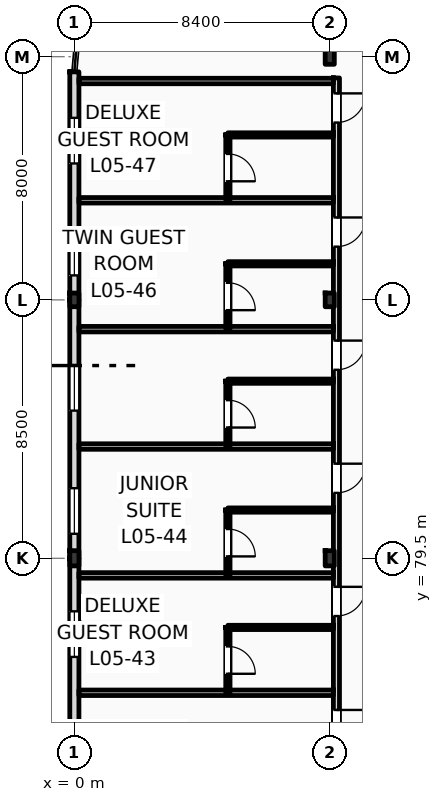
"""IFC4 building model, lengths in metres.
Left out: names, types, materials, properties, quantities, classifications, styles, units other than length and angle.
Written with IfcOpenShell. Run it as: python <this file> out.ifc"""

import sys

from ifc_helpers import new_model, si_unit, direction, frame, frame_2d, origin, origin_2d, place, context, subcontext, project, spatial, rectangle, i_section, extrude, element, fill, save


model = new_model("IFC4")
c1 = context("Model", 3, precision=1e-05, world=origin(), true_north=direction((0.0, 1.0)))
c2 = subcontext(c1, "Body", "Model", "MODEL_VIEW")
j1 = project(units=[si_unit("LENGTHUNIT", "METRE"), si_unit("PLANEANGLEUNIT", "RADIAN")], contexts=[c1])
p1 = place(None, origin())
s1 = spatial("IfcSite", under=j1, at=p1, CompositionType="ELEMENT")
p2 = place(p1, origin())
s2 = spatial("IfcBuilding", under=s1, at=p2, CompositionType="ELEMENT")
p3 = place(p2, frame((0.0, 0.0, 24.6)))
s3 = spatial("IfcBuildingStorey", under=s2, at=p3, CompositionType="ELEMENT", Elevation=24.6)
p4 = place(p3, frame((0.0, 79.5, 0.0), z_axis=(0.0, 0.0, 1.0), x_axis=(1.0, 0.0, 0.0)))
e1 = element("IfcColumn", 1, at=p4, inside=s3, PredefinedType="COLUMN", context=c2, shape_type="SweptSolid", body=[
    extrude(i_section(OverallWidth=0.3, OverallDepth=0.5, WebThickness=0.014, FlangeThickness=0.028, FilletRadius=0.027, at=origin_2d()), origin(), (0.0, 0.0, 1.0), 3.6),
])
p5 = place(p3, frame((0.0, 88.0, 0.0), z_axis=(0.0, 0.0, 1.0), x_axis=(1.0, 0.0, 0.0)))
e2 = element("IfcColumn", 2, at=p5, inside=s3, PredefinedType="COLUMN", context=c2, shape_type="SweptSolid", body=[
    extrude(i_section(OverallWidth=0.3, OverallDepth=0.45, WebThickness=0.014, FlangeThickness=0.026, FilletRadius=0.027, at=origin_2d()), origin(), (0.0, 0.0, 1.0), 3.6),
])
p6 = place(p3, frame((8.4, 79.5, 0.0), z_axis=(0.0, 0.0, 1.0), x_axis=(1.0, 0.0, 0.0)))
e3 = element("IfcColumn", 3, at=p6, inside=s3, PredefinedType="COLUMN", context=c2, shape_type="SweptSolid", body=[
    extrude(i_section(OverallWidth=0.3, OverallDepth=0.5, WebThickness=0.014, FlangeThickness=0.028, FilletRadius=0.027, at=origin_2d()), origin(), (0.0, 0.0, 1.0), 3.6),
])
p7 = place(p3, frame((8.4, 88.0, 0.0), z_axis=(0.0, 0.0, 1.0), x_axis=(1.0, 0.0, 0.0)))
e4 = element("IfcColumn", 4, at=p7, inside=s3, PredefinedType="COLUMN", context=c2, shape_type="SweptSolid", body=[
    extrude(i_section(OverallWidth=0.3, OverallDepth=0.45, WebThickness=0.014, FlangeThickness=0.026, FilletRadius=0.027, at=origin_2d()), origin(), (0.0, 0.0, 1.0), 3.6),
])
p8 = place(p3, frame((8.4, 96.0, 0.0), z_axis=(0.0, 0.0, 1.0), x_axis=(1.0, 0.0, 0.0)))
e5 = element("IfcColumn", 5, at=p8, inside=s3, PredefinedType="COLUMN", context=c2, shape_type="SweptSolid", body=[
    extrude(i_section(OverallWidth=0.3, OverallDepth=0.5, WebThickness=0.014, FlangeThickness=0.028, FilletRadius=0.027, at=origin_2d()), origin(), (0.0, 0.0, 1.0), 3.6),
])
p9 = place(p3, frame((0.0, 71.0, 0.0), z_axis=(0.0, 0.0, 1.0), x_axis=(0.0, 1.0, 0.0)))
e6 = element("IfcWall", 6, at=p9, inside=s3, PredefinedType="STANDARD", context=c2, shape_type="SweptSolid", body=[
    extrude(rectangle(XDim=8.5, YDim=0.3, at=frame_2d((4.25, 0.0))), origin(), (0.0, 0.0, 1.0), 2.93),
])
p10 = place(p9, frame((1.207, 0.0, 0.9)))
e7 = element("IfcOpeningElement", 7, at=p10, cuts=e6, PredefinedType="OPENING", context=c2, shape_type="SweptSolid", body=[
    extrude(rectangle(XDim=1.5, YDim=1.85, at=frame_2d((0.75, 0.925))), frame((0.0, 0.16, 0.0), z_axis=(0.0, -1.0, 0.0), x_axis=(1.0, 0.0, 0.0)), (0.0, 0.0, 1.0), 0.32),
])
p11 = place(p9, frame((5.256, 0.0, 0.9)))
e8 = element("IfcOpeningElement", 8, at=p11, cuts=e6, PredefinedType="OPENING", context=c2, shape_type="SweptSolid", body=[
    extrude(rectangle(XDim=1.5, YDim=1.85, at=frame_2d((0.75, 0.925))), frame((0.0, 0.16, 0.0), z_axis=(0.0, -1.0, 0.0), x_axis=(1.0, 0.0, 0.0)), (0.0, 0.0, 1.0), 0.32),
])
p12 = place(p3, frame((0.0, 79.5, 0.0), z_axis=(0.0, 0.0, 1.0), x_axis=(0.0, 1.0, 0.0)))
e9 = element("IfcWall", 9, at=p12, inside=s3, PredefinedType="STANDARD", context=c2, shape_type="SweptSolid", body=[
    extrude(rectangle(XDim=8.5, YDim=0.3, at=frame_2d((4.25, 0.0))), origin(), (0.0, 0.0, 1.0), 2.93),
])
p13 = place(p12, frame((0.806, 0.0, 0.9)))
e10 = element("IfcOpeningElement", 10, at=p13, cuts=e9, PredefinedType="OPENING", context=c2, shape_type="SweptSolid", body=[
    extrude(rectangle(XDim=1.5, YDim=1.85, at=frame_2d((0.75, 0.925))), frame((0.0, 0.16, 0.0), z_axis=(0.0, -1.0, 0.0), x_axis=(1.0, 0.0, 0.0)), (0.0, 0.0, 1.0), 0.32),
])
p14 = place(p12, frame((4.857, 0.0, 0.9)))
e11 = element("IfcOpeningElement", 11, at=p14, cuts=e9, PredefinedType="OPENING", context=c2, shape_type="SweptSolid", body=[
    extrude(rectangle(XDim=1.5, YDim=1.85, at=frame_2d((0.75, 0.925))), frame((0.0, 0.16, 0.0), z_axis=(0.0, -1.0, 0.0), x_axis=(1.0, 0.0, 0.0)), (0.0, 0.0, 1.0), 0.32),
])
p15 = place(p3, frame((0.0, 88.0, 0.0), z_axis=(0.0, 0.0, 1.0), x_axis=(0.0, 1.0, 0.0)))
e12 = element("IfcWall", 12, at=p15, inside=s3, PredefinedType="STANDARD", context=c2, shape_type="SweptSolid", body=[
    extrude(rectangle(XDim=7.5, YDim=0.3, at=frame_2d((3.75, 0.0))), origin(), (0.0, 0.0, 1.0), 3.34),
])
p16 = place(p15, frame((0.806, 0.0, 0.9)))
e13 = element("IfcOpeningElement", 13, at=p16, cuts=e12, PredefinedType="OPENING", context=c2, shape_type="SweptSolid", body=[
    extrude(rectangle(XDim=1.5, YDim=2.26, at=frame_2d((0.75, 1.13))), frame((0.0, 0.16, 0.0), z_axis=(0.0, -1.0, 0.0), x_axis=(1.0, 0.0, 0.0)), (0.0, 0.0, 1.0), 0.32),
])
p17 = place(p15, frame((4.488, 0.0, 0.9)))
e14 = element("IfcOpeningElement", 14, at=p17, cuts=e12, PredefinedType="OPENING", context=c2, shape_type="SweptSolid", body=[
    extrude(rectangle(XDim=1.5, YDim=2.26, at=frame_2d((0.75, 1.13))), frame((0.0, 0.16, 0.0), z_axis=(0.0, -1.0, 0.0), x_axis=(1.0, 0.0, 0.0)), (0.0, 0.0, 1.0), 0.32),
])
p18 = place(p3, frame((8.62, 62.64, 0.0), z_axis=(0.0, 0.0, 1.0), x_axis=(0.0, 1.0, 0.0)))
e15 = element("IfcWall", 15, at=p18, inside=s3, PredefinedType="PARTITIONING", context=c2, shape_type="SweptSolid", body=[
    extrude(rectangle(XDim=32.66, YDim=0.2, at=frame_2d((16.33, 0.0))), origin(), (0.0, 0.0, 1.0), 2.93),
])
p19 = place(p18, frame((2.843, 0.0, 0.0)))
e16 = element("IfcOpeningElement", 16, at=p19, cuts=e15, PredefinedType="OPENING", context=c2, shape_type="SweptSolid", body=[
    extrude(rectangle(XDim=0.96, YDim=2.2, at=frame_2d((0.48, 1.1))), frame((0.0, 0.11, 0.0), z_axis=(0.0, -1.0, 0.0), x_axis=(1.0, 0.0, 0.0)), (0.0, 0.0, 1.0), 0.22),
])
p20 = place(p18, frame((4.711, 0.0, 0.0)))
e17 = element("IfcOpeningElement", 17, at=p20, cuts=e15, PredefinedType="OPENING", context=c2, shape_type="SweptSolid", body=[
    extrude(rectangle(XDim=0.96, YDim=2.2, at=frame_2d((0.48, 1.1))), frame((0.0, 0.11, 0.0), z_axis=(0.0, -1.0, 0.0), x_axis=(1.0, 0.0, 0.0)), (0.0, 0.0, 1.0), 0.22),
])
p21 = place(p18, frame((10.911, 0.0, 0.0)))
e18 = element("IfcOpeningElement", 18, at=p21, cuts=e15, PredefinedType="OPENING", context=c2, shape_type="SweptSolid", body=[
    extrude(rectangle(XDim=0.96, YDim=2.2, at=frame_2d((0.48, 1.1))), frame((0.0, 0.11, 0.0), z_axis=(0.0, -1.0, 0.0), x_axis=(1.0, 0.0, 0.0)), (0.0, 0.0, 1.0), 0.22),
])
p22 = place(p18, frame((14.961, 0.0, 0.0)))
e19 = element("IfcOpeningElement", 19, at=p22, cuts=e15, PredefinedType="OPENING", context=c2, shape_type="SweptSolid", body=[
    extrude(rectangle(XDim=0.96, YDim=2.2, at=frame_2d((0.48, 1.1))), frame((0.0, 0.11, 0.0), z_axis=(0.0, -1.0, 0.0), x_axis=(1.0, 0.0, 0.0)), (0.0, 0.0, 1.0), 0.22),
])
p23 = place(p18, frame((19.012, 0.0, 0.0)))
e20 = element("IfcOpeningElement", 20, at=p23, cuts=e15, PredefinedType="OPENING", context=c2, shape_type="SweptSolid", body=[
    extrude(rectangle(XDim=0.96, YDim=2.2, at=frame_2d((0.48, 1.1))), frame((0.0, 0.11, 0.0), z_axis=(0.0, -1.0, 0.0), x_axis=(1.0, 0.0, 0.0)), (0.0, 0.0, 1.0), 0.22),
])
p24 = place(p18, frame((23.061, 0.0, 0.0)))
e21 = element("IfcOpeningElement", 21, at=p24, cuts=e15, PredefinedType="OPENING", context=c2, shape_type="SweptSolid", body=[
    extrude(rectangle(XDim=0.96, YDim=2.2, at=frame_2d((0.48, 1.1))), frame((0.0, 0.11, 0.0), z_axis=(0.0, -1.0, 0.0), x_axis=(1.0, 0.0, 0.0)), (0.0, 0.0, 1.0), 0.22),
])
p25 = place(p18, frame((27.111, 0.0, 0.0)))
e22 = element("IfcOpeningElement", 22, at=p25, cuts=e15, PredefinedType="OPENING", context=c2, shape_type="SweptSolid", body=[
    extrude(rectangle(XDim=0.96, YDim=2.2, at=frame_2d((0.48, 1.1))), frame((0.0, 0.11, 0.0), z_axis=(0.0, -1.0, 0.0), x_axis=(1.0, 0.0, 0.0)), (0.0, 0.0, 1.0), 0.22),
])
p26 = place(p18, frame((31.193, 0.0, 0.0)))
e23 = element("IfcOpeningElement", 23, at=p26, cuts=e15, PredefinedType="OPENING", context=c2, shape_type="SweptSolid", body=[
    extrude(rectangle(XDim=0.96, YDim=2.2, at=frame_2d((0.48, 1.1))), frame((0.0, 0.11, 0.0), z_axis=(0.0, -1.0, 0.0), x_axis=(1.0, 0.0, 0.0)), (0.0, 0.0, 1.0), 0.22),
])
for number, where, z_axis, x_axis in (
    (24, (0.15, 75.076, 0.0), (0.0, 0.0, 1.0), (1.0, 0.0, 0.0)),
    (25, (0.15, 78.937, 0.0), (0.0, 0.0, 1.0), (1.0, 0.0, 0.0)),
):
    element("IfcWall", number, at=place(p3, frame(where, z_axis=z_axis, x_axis=x_axis)), inside=s3, PredefinedType="PARTITIONING", context=c2, shape_type="SweptSolid", body=[
        extrude(rectangle(XDim=8.37, YDim=0.18, at=frame_2d((4.185, 0.0))), origin(), (0.0, 0.0, 1.0), 3.34),
    ])
p27 = place(p3, frame((5.05, 77.226, 0.0), z_axis=(0.0, 0.0, 1.0), x_axis=(1.0, 0.0, 0.0)))
e26 = element("IfcWall", 26, at=p27, inside=s3, PredefinedType="PARTITIONING", context=c2, shape_type="SweptSolid", body=[
    extrude(rectangle(XDim=3.47, YDim=0.14, at=frame_2d((1.735, 0.0))), origin(), (0.0, 0.0, 1.0), 3.34),
])
p28 = place(p3, frame((5.05, 75.076, 0.0), z_axis=(0.0, 0.0, 1.0), x_axis=(0.0, 1.0, 0.0)))
e27 = element("IfcWall", 27, at=p28, inside=s3, PredefinedType="PARTITIONING", context=c2, shape_type="SweptSolid", body=[
    extrude(rectangle(XDim=2.15, YDim=0.14, at=frame_2d((1.075, 0.0))), origin(), (0.0, 0.0, 1.0), 3.34),
])
p29 = place(p28, frame((0.625, 0.0, 0.0)))
e28 = element("IfcOpeningElement", 28, at=p29, cuts=e27, PredefinedType="OPENING", context=c2, shape_type="SweptSolid", body=[
    extrude(rectangle(XDim=0.9, YDim=2.1, at=frame_2d((0.45, 1.05))), frame((0.0, 0.08, 0.0), z_axis=(0.0, -1.0, 0.0), x_axis=(1.0, 0.0, 0.0)), (0.0, 0.0, 1.0), 0.16),
])
p30 = place(p3, frame((0.15, 83.176, 0.0), z_axis=(0.0, 0.0, 1.0), x_axis=(1.0, 0.0, 0.0)))
e29 = element("IfcWall", 29, at=p30, inside=s3, PredefinedType="PARTITIONING", context=c2, shape_type="SweptSolid", body=[
    extrude(rectangle(XDim=8.37, YDim=0.18, at=frame_2d((4.185, 0.0))), origin(), (0.0, 0.0, 1.0), 3.34),
])
p31 = place(p3, frame((5.05, 81.087, 0.0), z_axis=(0.0, 0.0, 1.0), x_axis=(1.0, 0.0, 0.0)))
e30 = element("IfcWall", 30, at=p31, inside=s3, PredefinedType="PARTITIONING", context=c2, shape_type="SweptSolid", body=[
    extrude(rectangle(XDim=3.47, YDim=0.14, at=frame_2d((1.735, 0.0))), origin(), (0.0, 0.0, 1.0), 3.34),
])
p32 = place(p3, frame((5.05, 78.937, 0.0), z_axis=(0.0, 0.0, 1.0), x_axis=(0.0, 1.0, 0.0)))
e31 = element("IfcWall", 31, at=p32, inside=s3, PredefinedType="PARTITIONING", context=c2, shape_type="SweptSolid", body=[
    extrude(rectangle(XDim=2.15, YDim=0.14, at=frame_2d((1.075, 0.0))), origin(), (0.0, 0.0, 1.0), 3.34),
])
p33 = place(p32, frame((0.625, 0.0, 0.0)))
e32 = element("IfcOpeningElement", 32, at=p33, cuts=e31, PredefinedType="OPENING", context=c2, shape_type="SweptSolid", body=[
    extrude(rectangle(XDim=0.9, YDim=2.1, at=frame_2d((0.45, 1.05))), frame((0.0, 0.08, 0.0), z_axis=(0.0, -1.0, 0.0), x_axis=(1.0, 0.0, 0.0)), (0.0, 0.0, 1.0), 0.16),
])
p34 = place(p3, frame((0.15, 87.037, 0.0), z_axis=(0.0, 0.0, 1.0), x_axis=(1.0, 0.0, 0.0)))
e33 = element("IfcWall", 33, at=p34, inside=s3, PredefinedType="PARTITIONING", context=c2, shape_type="SweptSolid", body=[
    extrude(rectangle(XDim=8.37, YDim=0.18, at=frame_2d((4.185, 0.0))), origin(), (0.0, 0.0, 1.0), 3.34),
])
p35 = place(p3, frame((5.05, 85.326, 0.0), z_axis=(0.0, 0.0, 1.0), x_axis=(1.0, 0.0, 0.0)))
e34 = element("IfcWall", 34, at=p35, inside=s3, PredefinedType="PARTITIONING", context=c2, shape_type="SweptSolid", body=[
    extrude(rectangle(XDim=3.47, YDim=0.14, at=frame_2d((1.735, 0.0))), origin(), (0.0, 0.0, 1.0), 3.34),
])
p36 = place(p3, frame((5.05, 83.176, 0.0), z_axis=(0.0, 0.0, 1.0), x_axis=(0.0, 1.0, 0.0)))
e35 = element("IfcWall", 35, at=p36, inside=s3, PredefinedType="PARTITIONING", context=c2, shape_type="SweptSolid", body=[
    extrude(rectangle(XDim=2.15, YDim=0.14, at=frame_2d((1.075, 0.0))), origin(), (0.0, 0.0, 1.0), 3.34),
])
p37 = place(p36, frame((0.625, 0.0, 0.0)))
e36 = element("IfcOpeningElement", 36, at=p37, cuts=e35, PredefinedType="OPENING", context=c2, shape_type="SweptSolid", body=[
    extrude(rectangle(XDim=0.9, YDim=2.1, at=frame_2d((0.45, 1.05))), frame((0.0, 0.08, 0.0), z_axis=(0.0, -1.0, 0.0), x_axis=(1.0, 0.0, 0.0)), (0.0, 0.0, 1.0), 0.16),
])
p38 = place(p3, frame((0.15, 91.276, 0.0), z_axis=(0.0, 0.0, 1.0), x_axis=(1.0, 0.0, 0.0)))
e37 = element("IfcWall", 37, at=p38, inside=s3, PredefinedType="PARTITIONING", context=c2, shape_type="SweptSolid", body=[
    extrude(rectangle(XDim=8.37, YDim=0.18, at=frame_2d((4.185, 0.0))), origin(), (0.0, 0.0, 1.0), 3.34),
])
p39 = place(p3, frame((5.05, 89.187, 0.0), z_axis=(0.0, 0.0, 1.0), x_axis=(1.0, 0.0, 0.0)))
e38 = element("IfcWall", 38, at=p39, inside=s3, PredefinedType="PARTITIONING", context=c2, shape_type="SweptSolid", body=[
    extrude(rectangle(XDim=3.47, YDim=0.14, at=frame_2d((1.735, 0.0))), origin(), (0.0, 0.0, 1.0), 3.34),
])
p40 = place(p3, frame((5.05, 87.037, 0.0), z_axis=(0.0, 0.0, 1.0), x_axis=(0.0, 1.0, 0.0)))
e39 = element("IfcWall", 39, at=p40, inside=s3, PredefinedType="PARTITIONING", context=c2, shape_type="SweptSolid", body=[
    extrude(rectangle(XDim=2.15, YDim=0.14, at=frame_2d((1.075, 0.0))), origin(), (0.0, 0.0, 1.0), 3.34),
])
p41 = place(p40, frame((0.625, 0.0, 0.0)))
e40 = element("IfcOpeningElement", 40, at=p41, cuts=e39, PredefinedType="OPENING", context=c2, shape_type="SweptSolid", body=[
    extrude(rectangle(XDim=0.9, YDim=2.1, at=frame_2d((0.45, 1.05))), frame((0.0, 0.08, 0.0), z_axis=(0.0, -1.0, 0.0), x_axis=(1.0, 0.0, 0.0)), (0.0, 0.0, 1.0), 0.16),
])
p42 = place(p3, frame((0.15, 95.2, 0.0), z_axis=(0.0, 0.0, 1.0), x_axis=(1.0, 0.0, 0.0)))
e41 = element("IfcWall", 41, at=p42, inside=s3, PredefinedType="PARTITIONING", context=c2, shape_type="SweptSolid", body=[
    extrude(rectangle(XDim=8.37, YDim=0.18, at=frame_2d((4.185, 0.0))), origin(), (0.0, 0.0, 1.0), 3.34),
])
p43 = place(p3, frame((5.05, 93.426, 0.0), z_axis=(0.0, 0.0, 1.0), x_axis=(1.0, 0.0, 0.0)))
e42 = element("IfcWall", 42, at=p43, inside=s3, PredefinedType="PARTITIONING", context=c2, shape_type="SweptSolid", body=[
    extrude(rectangle(XDim=3.47, YDim=0.14, at=frame_2d((1.735, 0.0))), origin(), (0.0, 0.0, 1.0), 3.34),
])
p44 = place(p3, frame((5.05, 91.276, 0.0), z_axis=(0.0, 0.0, 1.0), x_axis=(0.0, 1.0, 0.0)))
e43 = element("IfcWall", 43, at=p44, inside=s3, PredefinedType="PARTITIONING", context=c2, shape_type="SweptSolid", body=[
    extrude(rectangle(XDim=2.15, YDim=0.14, at=frame_2d((1.075, 0.0))), origin(), (0.0, 0.0, 1.0), 3.34),
])
p45 = place(p44, frame((0.625, 0.0, 0.0)))
e44 = element("IfcOpeningElement", 44, at=p45, cuts=e43, PredefinedType="OPENING", context=c2, shape_type="SweptSolid", body=[
    extrude(rectangle(XDim=0.9, YDim=2.1, at=frame_2d((0.45, 1.05))), frame((0.0, 0.08, 0.0), z_axis=(0.0, -1.0, 0.0), x_axis=(1.0, 0.0, 0.0)), (0.0, 0.0, 1.0), 0.16),
])
p46 = place(p11, origin())
e45 = element("IfcWindow", 45, at=p46, inside=s3, PartitioningType="DOUBLE_PANEL_VERTICAL", PredefinedType="WINDOW", context=c2, shape_type="SweptSolid", body=[
    extrude(rectangle(XDim=1.5, YDim=1.85, at=frame_2d((0.75, 0.925))), frame((0.0, 0.03, 0.0), z_axis=(0.0, -1.0, 0.0), x_axis=(1.0, 0.0, 0.0)), (0.0, 0.0, 1.0), 0.06),
])
fill(e8, e45)
p47 = place(p13, origin())
e46 = element("IfcWindow", 46, at=p47, inside=s3, PartitioningType="DOUBLE_PANEL_VERTICAL", PredefinedType="WINDOW", context=c2, shape_type="SweptSolid", body=[
    extrude(rectangle(XDim=1.5, YDim=1.85, at=frame_2d((0.75, 0.925))), frame((0.0, 0.03, 0.0), z_axis=(0.0, -1.0, 0.0), x_axis=(1.0, 0.0, 0.0)), (0.0, 0.0, 1.0), 0.06),
])
fill(e10, e46)
p48 = place(p14, origin())
e47 = element("IfcWindow", 47, at=p48, inside=s3, PartitioningType="DOUBLE_PANEL_VERTICAL", PredefinedType="WINDOW", context=c2, shape_type="SweptSolid", body=[
    extrude(rectangle(XDim=1.5, YDim=1.85, at=frame_2d((0.75, 0.925))), frame((0.0, 0.03, 0.0), z_axis=(0.0, -1.0, 0.0), x_axis=(1.0, 0.0, 0.0)), (0.0, 0.0, 1.0), 0.06),
])
fill(e11, e47)
p49 = place(p16, origin())
e48 = element("IfcWindow", 48, at=p49, inside=s3, PartitioningType="DOUBLE_PANEL_VERTICAL", PredefinedType="WINDOW", context=c2, shape_type="SweptSolid", body=[
    extrude(rectangle(XDim=1.5, YDim=2.26, at=frame_2d((0.75, 1.13))), frame((0.0, 0.03, 0.0), z_axis=(0.0, -1.0, 0.0), x_axis=(1.0, 0.0, 0.0)), (0.0, 0.0, 1.0), 0.06),
])
fill(e13, e48)
p50 = place(p17, origin())
e49 = element("IfcWindow", 49, at=p50, inside=s3, PartitioningType="DOUBLE_PANEL_VERTICAL", PredefinedType="WINDOW", context=c2, shape_type="SweptSolid", body=[
    extrude(rectangle(XDim=1.5, YDim=2.26, at=frame_2d((0.75, 1.13))), frame((0.0, 0.03, 0.0), z_axis=(0.0, -1.0, 0.0), x_axis=(1.0, 0.0, 0.0)), (0.0, 0.0, 1.0), 0.06),
])
fill(e14, e49)
p51 = place(p21, frame((0.96, 0.0, 0.0), z_axis=(0.0, 0.0, 1.0), x_axis=(-1.0, 0.0, 0.0)))
e50 = element("IfcDoor", 50, at=p51, inside=s3, OperationType="SINGLE_SWING_RIGHT", PredefinedType="DOOR", context=c2, shape_type="SweptSolid", body=[
    extrude(rectangle(XDim=0.96, YDim=2.2, at=frame_2d((0.48, 1.1))), frame((0.0, 0.025, 0.0), z_axis=(0.0, -1.0, 0.0), x_axis=(1.0, 0.0, 0.0)), (0.0, 0.0, 1.0), 0.05),
])
fill(e18, e50)
p52 = place(p22, frame((0.96, 0.0, 0.0), z_axis=(0.0, 0.0, 1.0), x_axis=(-1.0, 0.0, 0.0)))
e51 = element("IfcDoor", 51, at=p52, inside=s3, OperationType="SINGLE_SWING_RIGHT", PredefinedType="DOOR", context=c2, shape_type="SweptSolid", body=[
    extrude(rectangle(XDim=0.96, YDim=2.2, at=frame_2d((0.48, 1.1))), frame((0.0, 0.025, 0.0), z_axis=(0.0, -1.0, 0.0), x_axis=(1.0, 0.0, 0.0)), (0.0, 0.0, 1.0), 0.05),
])
fill(e19, e51)
p53 = place(p29, frame((0.9, 0.0, 0.0), z_axis=(0.0, 0.0, 1.0), x_axis=(-1.0, 0.0, 0.0)))
e52 = element("IfcDoor", 52, at=p53, inside=s3, OperationType="SINGLE_SWING_LEFT", PredefinedType="DOOR", context=c2, shape_type="SweptSolid", body=[
    extrude(rectangle(XDim=0.9, YDim=2.1, at=frame_2d((0.45, 1.05))), frame((0.0, 0.025, 0.0), z_axis=(0.0, -1.0, 0.0), x_axis=(1.0, 0.0, 0.0)), (0.0, 0.0, 1.0), 0.05),
])
fill(e28, e52)
p54 = place(p23, frame((0.96, 0.0, 0.0), z_axis=(0.0, 0.0, 1.0), x_axis=(-1.0, 0.0, 0.0)))
e53 = element("IfcDoor", 53, at=p54, inside=s3, OperationType="SINGLE_SWING_RIGHT", PredefinedType="DOOR", context=c2, shape_type="SweptSolid", body=[
    extrude(rectangle(XDim=0.96, YDim=2.2, at=frame_2d((0.48, 1.1))), frame((0.0, 0.025, 0.0), z_axis=(0.0, -1.0, 0.0), x_axis=(1.0, 0.0, 0.0)), (0.0, 0.0, 1.0), 0.05),
])
fill(e20, e53)
p55 = place(p33, frame((0.9, 0.0, 0.0), z_axis=(0.0, 0.0, 1.0), x_axis=(-1.0, 0.0, 0.0)))
e54 = element("IfcDoor", 54, at=p55, inside=s3, OperationType="SINGLE_SWING_LEFT", PredefinedType="DOOR", context=c2, shape_type="SweptSolid", body=[
    extrude(rectangle(XDim=0.9, YDim=2.1, at=frame_2d((0.45, 1.05))), frame((0.0, 0.025, 0.0), z_axis=(0.0, -1.0, 0.0), x_axis=(1.0, 0.0, 0.0)), (0.0, 0.0, 1.0), 0.05),
])
fill(e32, e54)
p56 = place(p24, frame((0.96, 0.0, 0.0), z_axis=(0.0, 0.0, 1.0), x_axis=(-1.0, 0.0, 0.0)))
e55 = element("IfcDoor", 55, at=p56, inside=s3, OperationType="SINGLE_SWING_RIGHT", PredefinedType="DOOR", context=c2, shape_type="SweptSolid", body=[
    extrude(rectangle(XDim=0.96, YDim=2.2, at=frame_2d((0.48, 1.1))), frame((0.0, 0.025, 0.0), z_axis=(0.0, -1.0, 0.0), x_axis=(1.0, 0.0, 0.0)), (0.0, 0.0, 1.0), 0.05),
])
fill(e21, e55)
p57 = place(p37, frame((0.9, 0.0, 0.0), z_axis=(0.0, 0.0, 1.0), x_axis=(-1.0, 0.0, 0.0)))
e56 = element("IfcDoor", 56, at=p57, inside=s3, OperationType="SINGLE_SWING_LEFT", PredefinedType="DOOR", context=c2, shape_type="SweptSolid", body=[
    extrude(rectangle(XDim=0.9, YDim=2.1, at=frame_2d((0.45, 1.05))), frame((0.0, 0.025, 0.0), z_axis=(0.0, -1.0, 0.0), x_axis=(1.0, 0.0, 0.0)), (0.0, 0.0, 1.0), 0.05),
])
fill(e36, e56)
p58 = place(p25, frame((0.96, 0.0, 0.0), z_axis=(0.0, 0.0, 1.0), x_axis=(-1.0, 0.0, 0.0)))
e57 = element("IfcDoor", 57, at=p58, inside=s3, OperationType="SINGLE_SWING_RIGHT", PredefinedType="DOOR", context=c2, shape_type="SweptSolid", body=[
    extrude(rectangle(XDim=0.96, YDim=2.2, at=frame_2d((0.48, 1.1))), frame((0.0, 0.025, 0.0), z_axis=(0.0, -1.0, 0.0), x_axis=(1.0, 0.0, 0.0)), (0.0, 0.0, 1.0), 0.05),
])
fill(e22, e57)
p59 = place(p41, frame((0.9, 0.0, 0.0), z_axis=(0.0, 0.0, 1.0), x_axis=(-1.0, 0.0, 0.0)))
e58 = element("IfcDoor", 58, at=p59, inside=s3, OperationType="SINGLE_SWING_LEFT", PredefinedType="DOOR", context=c2, shape_type="SweptSolid", body=[
    extrude(rectangle(XDim=0.9, YDim=2.1, at=frame_2d((0.45, 1.05))), frame((0.0, 0.025, 0.0), z_axis=(0.0, -1.0, 0.0), x_axis=(1.0, 0.0, 0.0)), (0.0, 0.0, 1.0), 0.05),
])
fill(e40, e58)
p60 = place(p26, frame((0.96, 0.0, 0.0), z_axis=(0.0, 0.0, 1.0), x_axis=(-1.0, 0.0, 0.0)))
e59 = element("IfcDoor", 59, at=p60, inside=s3, OperationType="SINGLE_SWING_RIGHT", PredefinedType="DOOR", context=c2, shape_type="SweptSolid", body=[
    extrude(rectangle(XDim=0.96, YDim=2.2, at=frame_2d((0.48, 1.1))), frame((0.0, 0.025, 0.0), z_axis=(0.0, -1.0, 0.0), x_axis=(1.0, 0.0, 0.0)), (0.0, 0.0, 1.0), 0.05),
])
fill(e23, e59)
p61 = place(p45, frame((0.9, 0.0, 0.0), z_axis=(0.0, 0.0, 1.0), x_axis=(-1.0, 0.0, 0.0)))
e60 = element("IfcDoor", 60, at=p61, inside=s3, OperationType="SINGLE_SWING_LEFT", PredefinedType="DOOR", context=c2, shape_type="SweptSolid", body=[
    extrude(rectangle(XDim=0.9, YDim=2.1, at=frame_2d((0.45, 1.05))), frame((0.0, 0.025, 0.0), z_axis=(0.0, -1.0, 0.0), x_axis=(1.0, 0.0, 0.0)), (0.0, 0.0, 1.0), 0.05),
])
fill(e44, e60)
save(model, sys.argv[1])
